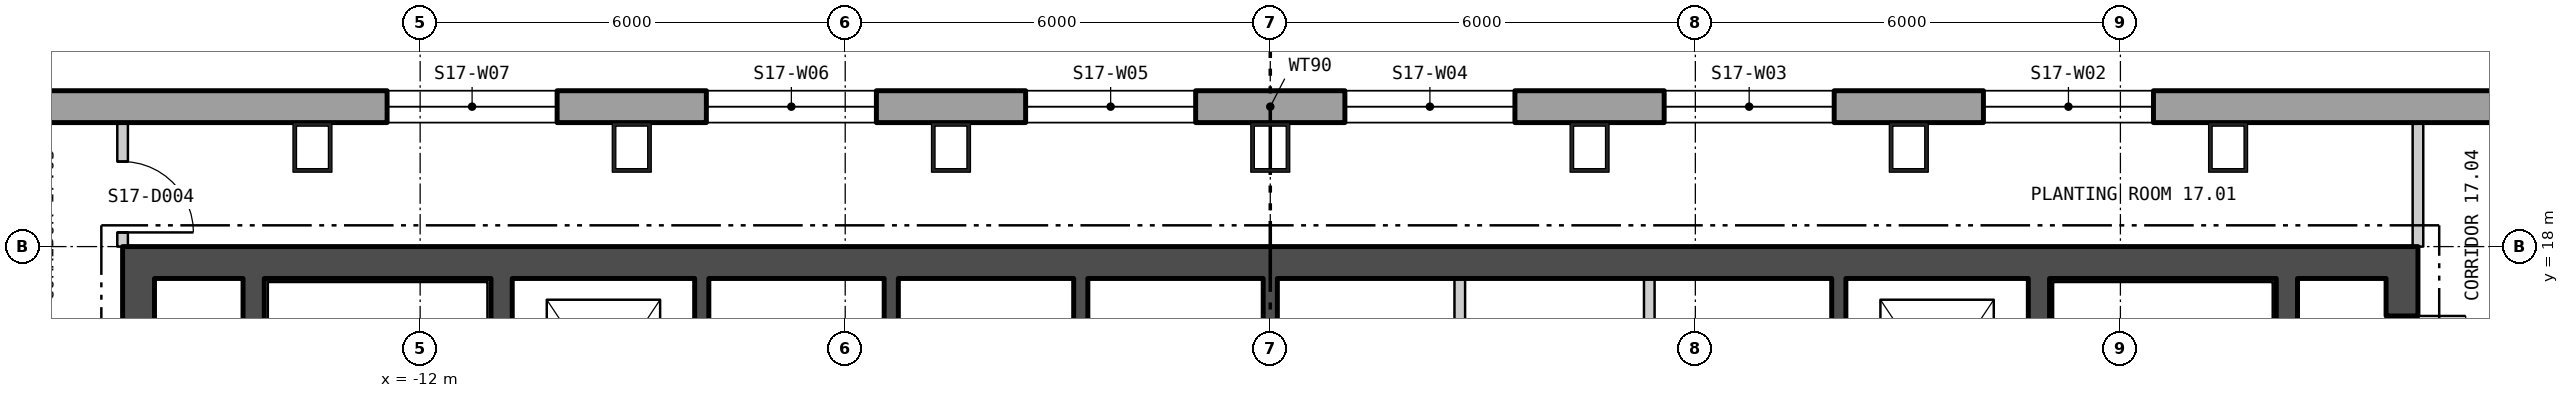
"""IFC4 building model, lengths in metres.
Left out: names, types, materials, properties, quantities, classifications, styles, units other than length and angle.
Written with IfcOpenShell. Run it as: python <this file> out.ifc"""

import sys

from ifc_helpers import new_model, si_unit, direction, frame, frame_2d, origin, origin_2d, place, context, subcontext, project, spatial, polyline, rectangle, hollow_rectangle, outline, extrude, element, fill, save


model = new_model("IFC4")
c1 = context("Model", 3, precision=1e-05, world=origin(), true_north=direction((0.0, 1.0)))
c2 = subcontext(c1, "Body", "Model", "MODEL_VIEW")
j1 = project(units=[si_unit("LENGTHUNIT", "METRE"), si_unit("PLANEANGLEUNIT", "RADIAN")], contexts=[c1])
p1 = place(None, origin())
s1 = spatial("IfcSite", under=j1, at=p1, CompositionType="ELEMENT")
p2 = place(p1, origin())
s2 = spatial("IfcBuilding", under=s1, at=p2, CompositionType="ELEMENT")
p3 = place(p2, frame((0.0, 0.0, 227.7)))
s3 = spatial("IfcBuildingStorey", under=s2, at=p3, CompositionType="ELEMENT", Elevation=227.7)
for number, where, z_axis, x_axis in (
    (1, (13.52, 19.4, 0.0), (0.0, 0.0, 1.0), (-1.0, 0.0, 0.0)),
    (2, (9.013, 19.4, 0.0), (0.0, 0.0, 1.0), (-1.0, 0.0, 0.0)),
    (3, (4.507, 19.4, 0.0), (0.0, 0.0, 1.0), (-1.0, 0.0, 0.0)),
    (4, (0.0, 19.4, 0.0), (0.0, 0.0, 1.0), (-1.0, 0.0, 0.0)),
    (5, (-4.507, 19.4, 0.0), (0.0, 0.0, 1.0), (-1.0, 0.0, 0.0)),
    (6, (-9.013, 19.4, 0.0), (0.0, 0.0, 1.0), (-1.0, 0.0, 0.0)),
    (7, (-13.52, 19.4, 0.0), (0.0, 0.0, 1.0), (-1.0, 0.0, 0.0)),
):
    element("IfcColumn", number, at=place(p3, frame(where, z_axis=z_axis, x_axis=x_axis)), inside=s3, PredefinedType="COLUMN", context=c2, shape_type="SweptSolid", body=[
        extrude(hollow_rectangle(XDim=0.55, YDim=0.7, WallThickness=0.05, at=origin_2d()), origin(), (0.0, 0.0, 1.0), 3.9),
    ])
p4 = place(p3, frame((22.865, 19.975, -0.4), z_axis=(0.0, 0.0, 1.0), x_axis=(-1.0, 0.0, 0.0)))
e8 = element("IfcWall", 8, at=p4, inside=s3, PredefinedType="SOLIDWALL", context=c2, shape_type="SweptSolid", body=[
    extrude(outline(polyline([(-0.13, -0.225), (45.86, -0.225), (45.6, 0.225), (0.13, 0.225), (-0.13, -0.225)])), origin(), (0.0, 0.0, 1.0), 3.9),
])
p5 = place(p4, frame((1.424, 0.0, 1.3)))
e9 = element("IfcOpeningElement", 9, at=p5, cuts=e8, PredefinedType="OPENING", context=c2, shape_type="SweptSolid", body=[
    extrude(rectangle(XDim=2.4, YDim=2.0, at=frame_2d((1.2, 1.0))), frame((0.0, 0.235, 0.0), z_axis=(0.0, -1.0, 0.0), x_axis=(1.0, 0.0, 0.0)), (0.0, 0.0, 1.0), 0.47),
])
p6 = place(p4, frame((10.399, 0.0, 1.3)))
e10 = element("IfcOpeningElement", 10, at=p6, cuts=e8, PredefinedType="OPENING", context=c2, shape_type="SweptSolid", body=[
    extrude(rectangle(XDim=2.4, YDim=2.0, at=frame_2d((1.2, 1.0))), frame((0.0, 0.235, 0.0), z_axis=(0.0, -1.0, 0.0), x_axis=(1.0, 0.0, 0.0)), (0.0, 0.0, 1.0), 0.47),
])
p7 = place(p4, frame((14.905, 0.0, 1.3)))
e11 = element("IfcOpeningElement", 11, at=p7, cuts=e8, PredefinedType="OPENING", context=c2, shape_type="SweptSolid", body=[
    extrude(rectangle(XDim=2.4, YDim=2.0, at=frame_2d((1.2, 1.0))), frame((0.0, 0.235, 0.0), z_axis=(0.0, -1.0, 0.0), x_axis=(1.0, 0.0, 0.0)), (0.0, 0.0, 1.0), 0.47),
])
p8 = place(p4, frame((19.412, 0.0, 1.3)))
e12 = element("IfcOpeningElement", 12, at=p8, cuts=e8, PredefinedType="OPENING", context=c2, shape_type="SweptSolid", body=[
    extrude(rectangle(XDim=2.4, YDim=2.0, at=frame_2d((1.2, 1.0))), frame((0.0, 0.235, 0.0), z_axis=(0.0, -1.0, 0.0), x_axis=(1.0, 0.0, 0.0)), (0.0, 0.0, 1.0), 0.47),
])
p9 = place(p4, frame((23.918, 0.0, 1.3)))
e13 = element("IfcOpeningElement", 13, at=p9, cuts=e8, PredefinedType="OPENING", context=c2, shape_type="SweptSolid", body=[
    extrude(rectangle(XDim=2.4, YDim=2.0, at=frame_2d((1.2, 1.0))), frame((0.0, 0.235, 0.0), z_axis=(0.0, -1.0, 0.0), x_axis=(1.0, 0.0, 0.0)), (0.0, 0.0, 1.0), 0.47),
])
p10 = place(p4, frame((28.425, 0.0, 1.3)))
e14 = element("IfcOpeningElement", 14, at=p10, cuts=e8, PredefinedType="OPENING", context=c2, shape_type="SweptSolid", body=[
    extrude(rectangle(XDim=2.4, YDim=2.0, at=frame_2d((1.2, 1.0))), frame((0.0, 0.235, 0.0), z_axis=(0.0, -1.0, 0.0), x_axis=(1.0, 0.0, 0.0)), (0.0, 0.0, 1.0), 0.47),
])
p11 = place(p4, frame((32.932, 0.0, 1.3)))
e15 = element("IfcOpeningElement", 15, at=p11, cuts=e8, PredefinedType="OPENING", context=c2, shape_type="SweptSolid", body=[
    extrude(rectangle(XDim=2.4, YDim=2.0, at=frame_2d((1.2, 1.0))), frame((0.0, 0.235, 0.0), z_axis=(0.0, -1.0, 0.0), x_axis=(1.0, 0.0, 0.0)), (0.0, 0.0, 1.0), 0.47),
])
p12 = place(p4, frame((41.907, 0.0, 1.3)))
e16 = element("IfcOpeningElement", 16, at=p12, cuts=e8, PredefinedType="OPENING", context=c2, shape_type="SweptSolid", body=[
    extrude(rectangle(XDim=2.4, YDim=2.0, at=frame_2d((1.2, 1.0))), frame((0.0, 0.235, 0.0), z_axis=(0.0, -1.0, 0.0), x_axis=(1.0, 0.0, 0.0)), (0.0, 0.0, 1.0), 0.47),
])
p13 = place(p3, frame((-16.2, 17.775, 0.0), z_axis=(0.0, 0.0, 1.0), x_axis=(1.0, 0.0, 0.0)))
e17 = element("IfcWall", 17, at=p13, inside=s3, PredefinedType="SHEAR", context=c2, shape_type="SweptSolid", body=[
    extrude(rectangle(XDim=32.4, YDim=0.45, at=frame_2d((16.2, 0.0))), origin(), (0.0, 0.0, 1.0), 3.7),
])
p14 = place(p3, frame((-15.975, 2.45, 0.0), z_axis=(0.0, 0.0, 1.0), x_axis=(0.0, 1.0, 0.0)))
e18 = element("IfcWall", 18, at=p14, inside=s3, PredefinedType="SHEAR", context=c2, shape_type="SweptSolid", body=[
    extrude(rectangle(XDim=15.1, YDim=0.45, at=frame_2d((7.55, 0.0))), origin(), (0.0, 0.0, 1.0), 3.7),
])
p15 = place(p14, frame((4.4, 0.0, 0.0)))
e19 = element("IfcOpeningElement", 19, at=p15, cuts=e18, PredefinedType="OPENING", context=c2, shape_type="SweptSolid", body=[
    extrude(rectangle(XDim=1.5, YDim=2.1, at=frame_2d((0.75, 1.05))), frame((0.0, 0.235, 0.0), z_axis=(0.0, -1.0, 0.0), x_axis=(1.0, 0.0, 0.0)), (0.0, 0.0, 1.0), 0.47),
])
p16 = place(p14, frame((0.85, 0.0, 0.0)))
e20 = element("IfcOpeningElement", 20, at=p16, cuts=e18, PredefinedType="OPENING", context=c2, shape_type="SweptSolid", body=[
    extrude(rectangle(XDim=0.9, YDim=2.1, at=frame_2d((0.45, 1.05))), frame((0.0, 0.235, 0.0), z_axis=(0.0, -1.0, 0.0), x_axis=(1.0, 0.0, 0.0)), (0.0, 0.0, 1.0), 0.47),
])
p17 = place(p14, frame((3.0, 0.0, 0.0)))
e21 = element("IfcOpeningElement", 21, at=p17, cuts=e18, PredefinedType="OPENING", context=c2, shape_type="SweptSolid", body=[
    extrude(rectangle(XDim=1.0, YDim=2.1, at=frame_2d((0.5, 1.05))), frame((0.0, 0.235, 0.0), z_axis=(0.0, -1.0, 0.0), x_axis=(1.0, 0.0, 0.0)), (0.0, 0.0, 1.0), 0.47),
])
p18 = place(p14, frame((8.951, 0.0, 0.0)))
e22 = element("IfcOpeningElement", 22, at=p18, cuts=e18, PredefinedType="OPENING", context=c2, shape_type="SweptSolid", body=[
    extrude(rectangle(XDim=0.9, YDim=2.1, at=frame_2d((0.45, 1.05))), frame((0.0, 0.235, 0.0), z_axis=(0.0, -1.0, 0.0), x_axis=(1.0, 0.0, 0.0)), (0.0, 0.0, 1.0), 0.47),
])
p19 = place(p14, frame((13.551, 0.0, 0.0)))
e23 = element("IfcOpeningElement", 23, at=p19, cuts=e18, PredefinedType="OPENING", context=c2, shape_type="SweptSolid", body=[
    extrude(rectangle(XDim=0.9, YDim=2.1, at=frame_2d((0.45, 1.05))), frame((0.0, 0.235, 0.0), z_axis=(0.0, -1.0, 0.0), x_axis=(1.0, 0.0, 0.0)), (0.0, 0.0, 1.0), 0.47),
])
p20 = place(p3, frame((15.975, 2.45, 0.0), z_axis=(0.0, 0.0, 1.0), x_axis=(0.0, 1.0, 0.0)))
e24 = element("IfcWall", 24, at=p20, inside=s3, PredefinedType="SHEAR", context=c2, shape_type="SweptSolid", body=[
    extrude(rectangle(XDim=15.1, YDim=0.45, at=frame_2d((7.55, 0.0))), origin(), (0.0, 0.0, 1.0), 3.7),
])
p21 = place(p20, frame((4.4, 0.0, 0.0)))
e25 = element("IfcOpeningElement", 25, at=p21, cuts=e24, PredefinedType="OPENING", context=c2, shape_type="SweptSolid", body=[
    extrude(rectangle(XDim=1.5, YDim=2.1, at=frame_2d((0.75, 1.05))), frame((0.0, 0.235, 0.0), z_axis=(0.0, -1.0, 0.0), x_axis=(1.0, 0.0, 0.0)), (0.0, 0.0, 1.0), 0.47),
])
p22 = place(p20, frame((0.4, 0.0, 0.0)))
e26 = element("IfcOpeningElement", 26, at=p22, cuts=e24, PredefinedType="OPENING", context=c2, shape_type="SweptSolid", body=[
    extrude(rectangle(XDim=1.0, YDim=2.1, at=frame_2d((0.5, 1.05))), frame((0.0, 0.235, 0.0), z_axis=(0.0, -1.0, 0.0), x_axis=(1.0, 0.0, 0.0)), (0.0, 0.0, 1.0), 0.47),
])
p23 = place(p20, frame((2.5, 0.0, 0.0)))
e27 = element("IfcOpeningElement", 27, at=p23, cuts=e24, PredefinedType="OPENING", context=c2, shape_type="SweptSolid", body=[
    extrude(rectangle(XDim=0.9, YDim=2.1, at=frame_2d((0.45, 1.05))), frame((0.0, 0.235, 0.0), z_axis=(0.0, -1.0, 0.0), x_axis=(1.0, 0.0, 0.0)), (0.0, 0.0, 1.0), 0.47),
])
p24 = place(p20, frame((9.071, 0.0, 0.0)))
e28 = element("IfcOpeningElement", 28, at=p24, cuts=e24, PredefinedType="OPENING", context=c2, shape_type="SweptSolid", body=[
    extrude(rectangle(XDim=0.9, YDim=2.1, at=frame_2d((0.45, 1.05))), frame((0.0, 0.235, 0.0), z_axis=(0.0, -1.0, 0.0), x_axis=(1.0, 0.0, 0.0)), (0.0, 0.0, 1.0), 0.47),
])
p25 = place(p20, frame((13.671, 0.0, 0.0)))
e29 = element("IfcOpeningElement", 29, at=p25, cuts=e24, PredefinedType="OPENING", context=c2, shape_type="SweptSolid", body=[
    extrude(rectangle(XDim=0.9, YDim=2.1, at=frame_2d((0.45, 1.05))), frame((0.0, 0.235, 0.0), z_axis=(0.0, -1.0, 0.0), x_axis=(1.0, 0.0, 0.0)), (0.0, 0.0, 1.0), 0.47),
])
p26 = place(p3, frame((-10.85, 2.45, 0.0), z_axis=(0.0, 0.0, 1.0), x_axis=(0.0, 1.0, 0.0)))
e30 = element("IfcWall", 30, at=p26, inside=s3, PredefinedType="SHEAR", context=c2, shape_type="SweptSolid", body=[
    extrude(rectangle(XDim=15.1, YDim=0.3, at=frame_2d((7.55, 0.0))), origin(), (0.0, 0.0, 1.0), 3.7),
])
p27 = place(p26, frame((3.525, 0.0, 0.0)))
e31 = element("IfcOpeningElement", 31, at=p27, cuts=e30, PredefinedType="OPENING", context=c2, shape_type="SweptSolid", body=[
    extrude(rectangle(XDim=1.25, YDim=2.1, at=frame_2d((0.625, 1.05))), frame((0.0, 0.16, 0.0), z_axis=(0.0, -1.0, 0.0), x_axis=(1.0, 0.0, 0.0)), (0.0, 0.0, 1.0), 0.32),
])
p28 = place(p26, frame((1.15, 0.0, 0.0)))
e32 = element("IfcOpeningElement", 32, at=p28, cuts=e30, PredefinedType="OPENING", context=c2, shape_type="SweptSolid", body=[
    extrude(rectangle(XDim=1.0, YDim=2.1, at=frame_2d((0.5, 1.05))), frame((0.0, 0.16, 0.0), z_axis=(0.0, -1.0, 0.0), x_axis=(1.0, 0.0, 0.0)), (0.0, 0.0, 1.0), 0.32),
])
p29 = place(p3, frame((-14.35, 2.45, 0.0), z_axis=(0.0, 0.0, 1.0), x_axis=(0.0, 1.0, 0.0)))
e33 = element("IfcWall", 33, at=p29, inside=s3, PredefinedType="SHEAR", context=c2, shape_type="SweptSolid", body=[
    extrude(rectangle(XDim=15.1, YDim=0.3, at=frame_2d((7.55, 0.0))), origin(), (0.0, 0.0, 1.0), 3.7),
])
p30 = place(p29, frame((4.4, 0.0, 0.0)))
e34 = element("IfcOpeningElement", 34, at=p30, cuts=e33, PredefinedType="OPENING", context=c2, shape_type="SweptSolid", body=[
    extrude(rectangle(XDim=1.5, YDim=2.1, at=frame_2d((0.75, 1.05))), frame((0.0, 0.16, 0.0), z_axis=(0.0, -1.0, 0.0), x_axis=(1.0, 0.0, 0.0)), (0.0, 0.0, 1.0), 0.32),
])
p31 = place(p3, frame((10.85, 2.45, 0.0), z_axis=(0.0, 0.0, 1.0), x_axis=(0.0, 1.0, 0.0)))
e35 = element("IfcWall", 35, at=p31, inside=s3, PredefinedType="SHEAR", context=c2, shape_type="SweptSolid", body=[
    extrude(rectangle(XDim=15.1, YDim=0.3, at=frame_2d((7.55, 0.0))), origin(), (0.0, 0.0, 1.0), 3.7),
])
p32 = place(p31, frame((3.525, 0.0, 0.0)))
e36 = element("IfcOpeningElement", 36, at=p32, cuts=e35, PredefinedType="OPENING", context=c2, shape_type="SweptSolid", body=[
    extrude(rectangle(XDim=1.25, YDim=2.1, at=frame_2d((0.625, 1.05))), frame((0.0, 0.16, 0.0), z_axis=(0.0, -1.0, 0.0), x_axis=(1.0, 0.0, 0.0)), (0.0, 0.0, 1.0), 0.32),
])
p33 = place(p31, frame((1.15, 0.0, 0.0)))
e37 = element("IfcOpeningElement", 37, at=p33, cuts=e35, PredefinedType="OPENING", context=c2, shape_type="SweptSolid", body=[
    extrude(rectangle(XDim=1.0, YDim=2.1, at=frame_2d((0.5, 1.05))), frame((0.0, 0.16, 0.0), z_axis=(0.0, -1.0, 0.0), x_axis=(1.0, 0.0, 0.0)), (0.0, 0.0, 1.0), 0.32),
])
p34 = place(p3, frame((14.35, 2.45, 0.0), z_axis=(0.0, 0.0, 1.0), x_axis=(0.0, 1.0, 0.0)))
e38 = element("IfcWall", 38, at=p34, inside=s3, PredefinedType="SHEAR", context=c2, shape_type="SweptSolid", body=[
    extrude(rectangle(XDim=15.1, YDim=0.3, at=frame_2d((7.55, 0.0))), origin(), (0.0, 0.0, 1.0), 3.7),
])
p35 = place(p34, frame((4.4, 0.0, 0.0)))
e39 = element("IfcOpeningElement", 39, at=p35, cuts=e38, PredefinedType="OPENING", context=c2, shape_type="SweptSolid", body=[
    extrude(rectangle(XDim=1.5, YDim=2.1, at=frame_2d((0.75, 1.05))), frame((0.0, 0.16, 0.0), z_axis=(0.0, -1.0, 0.0), x_axis=(1.0, 0.0, 0.0)), (0.0, 0.0, 1.0), 0.32),
])
for number, where, z_axis, x_axis in (
    (40, (-8.025, 14.7, 0.0), (0.0, 0.0, 1.0), (0.0, 1.0, 0.0)),
    (41, (-5.35, 14.7, 0.0), (0.0, 0.0, 1.0), (0.0, 1.0, 0.0)),
    (42, (-2.675, 14.7, 0.0), (0.0, 0.0, 1.0), (0.0, 1.0, 0.0)),
    (43, (0.0, 14.7, 0.0), (0.0, 0.0, 1.0), (0.0, 1.0, 0.0)),
):
    element("IfcWall", number, at=place(p3, frame(where, z_axis=z_axis, x_axis=x_axis)), inside=s3, PredefinedType="SHEAR", context=c2, shape_type="SweptSolid", body=[
        extrude(rectangle(XDim=2.85, YDim=0.2, at=frame_2d((1.425, 0.0))), origin(), (0.0, 0.0, 1.0), 3.7),
    ])
for number, where, z_axis, x_axis in (
    (44, (2.675, 14.7, 0.0), (0.0, 0.0, 1.0), (0.0, 1.0, 0.0)),
    (45, (5.35, 14.7, 0.0), (0.0, 0.0, 1.0), (0.0, 1.0, 0.0)),
):
    element("IfcWall", number, at=place(p3, frame(where, z_axis=z_axis, x_axis=x_axis)), inside=s3, PredefinedType="PARTITIONING", context=c2, shape_type="SweptSolid", body=[
        extrude(rectangle(XDim=2.85, YDim=0.15, at=frame_2d((1.425, 0.0))), origin(), (0.0, 0.0, 1.0), 3.7),
    ])
p36 = place(p3, frame((8.025, 14.7, 0.0), z_axis=(0.0, 0.0, 1.0), x_axis=(0.0, 1.0, 0.0)))
e46 = element("IfcWall", 46, at=p36, inside=s3, PredefinedType="SHEAR", context=c2, shape_type="SweptSolid", body=[
    extrude(rectangle(XDim=2.85, YDim=0.2, at=frame_2d((1.425, 0.0))), origin(), (0.0, 0.0, 1.0), 3.7),
])
p37 = place(p3, frame((-16.2, 18.0, 0.0), z_axis=(0.0, 0.0, 1.0), x_axis=(0.0, 1.0, 0.0)))
e47 = element("IfcWall", 47, at=p37, inside=s3, PredefinedType="PARTITIONING", context=c2, shape_type="SweptSolid", body=[
    extrude(rectangle(XDim=1.75, YDim=0.15, at=frame_2d((0.875, 0.0))), origin(), (0.0, 0.0, 1.0), 3.7),
])
p38 = place(p37, frame((0.2, 0.0, 0.0)))
e48 = element("IfcOpeningElement", 48, at=p38, cuts=e47, PredefinedType="OPENING", context=c2, shape_type="SweptSolid", body=[
    extrude(rectangle(XDim=1.0, YDim=2.1, at=frame_2d((0.5, 1.05))), frame((0.0, 0.085, 0.0), z_axis=(0.0, -1.0, 0.0), x_axis=(1.0, 0.0, 0.0)), (0.0, 0.0, 1.0), 0.17),
])
p39 = place(p3, frame((16.2, 18.0, 0.0), z_axis=(0.0, 0.0, 1.0), x_axis=(0.0, 1.0, 0.0)))
e49 = element("IfcWall", 49, at=p39, inside=s3, PredefinedType="PARTITIONING", context=c2, shape_type="SweptSolid", body=[
    extrude(rectangle(XDim=1.75, YDim=0.15, at=frame_2d((0.875, 0.0))), origin(), (0.0, 0.0, 1.0), 3.7),
])
p40 = place(p6, origin())
e50 = element("IfcWindow", 50, at=p40, inside=s3, PartitioningType="SINGLE_PANEL", PredefinedType="WINDOW", context=c2, shape_type="SweptSolid", body=[
    extrude(rectangle(XDim=2.4, YDim=2.0, at=frame_2d((1.2, 1.0))), frame((0.0, 0.105, 0.0), z_axis=(0.0, -1.0, 0.0), x_axis=(1.0, 0.0, 0.0)), (0.0, 0.0, 1.0), 0.06),
])
fill(e10, e50)
p41 = place(p7, origin())
e51 = element("IfcWindow", 51, at=p41, inside=s3, PartitioningType="SINGLE_PANEL", PredefinedType="WINDOW", context=c2, shape_type="SweptSolid", body=[
    extrude(rectangle(XDim=2.4, YDim=2.0, at=frame_2d((1.2, 1.0))), frame((0.0, 0.105, 0.0), z_axis=(0.0, -1.0, 0.0), x_axis=(1.0, 0.0, 0.0)), (0.0, 0.0, 1.0), 0.06),
])
fill(e11, e51)
p42 = place(p8, origin())
e52 = element("IfcWindow", 52, at=p42, inside=s3, PartitioningType="SINGLE_PANEL", PredefinedType="WINDOW", context=c2, shape_type="SweptSolid", body=[
    extrude(rectangle(XDim=2.4, YDim=2.0, at=frame_2d((1.2, 1.0))), frame((0.0, 0.105, 0.0), z_axis=(0.0, -1.0, 0.0), x_axis=(1.0, 0.0, 0.0)), (0.0, 0.0, 1.0), 0.06),
])
fill(e12, e52)
p43 = place(p9, origin())
e53 = element("IfcWindow", 53, at=p43, inside=s3, PartitioningType="SINGLE_PANEL", PredefinedType="WINDOW", context=c2, shape_type="SweptSolid", body=[
    extrude(rectangle(XDim=2.4, YDim=2.0, at=frame_2d((1.2, 1.0))), frame((0.0, 0.105, 0.0), z_axis=(0.0, -1.0, 0.0), x_axis=(1.0, 0.0, 0.0)), (0.0, 0.0, 1.0), 0.06),
])
fill(e13, e53)
p44 = place(p10, origin())
e54 = element("IfcWindow", 54, at=p44, inside=s3, PartitioningType="SINGLE_PANEL", PredefinedType="WINDOW", context=c2, shape_type="SweptSolid", body=[
    extrude(rectangle(XDim=2.4, YDim=2.0, at=frame_2d((1.2, 1.0))), frame((0.0, 0.105, 0.0), z_axis=(0.0, -1.0, 0.0), x_axis=(1.0, 0.0, 0.0)), (0.0, 0.0, 1.0), 0.06),
])
fill(e14, e54)
p45 = place(p11, origin())
e55 = element("IfcWindow", 55, at=p45, inside=s3, PartitioningType="SINGLE_PANEL", PredefinedType="WINDOW", context=c2, shape_type="SweptSolid", body=[
    extrude(rectangle(XDim=2.4, YDim=2.0, at=frame_2d((1.2, 1.0))), frame((0.0, 0.105, 0.0), z_axis=(0.0, -1.0, 0.0), x_axis=(1.0, 0.0, 0.0)), (0.0, 0.0, 1.0), 0.06),
])
fill(e15, e55)
p46 = place(p25, origin())
e56 = element("IfcDoor", 56, at=p46, inside=s3, OperationType="SINGLE_SWING_RIGHT", PredefinedType="DOOR", context=c2, shape_type="SweptSolid", body=[
    extrude(rectangle(XDim=0.9, YDim=2.1, at=frame_2d((0.45, 1.05))), frame((0.0, 0.025, 0.0), z_axis=(0.0, -1.0, 0.0), x_axis=(1.0, 0.0, 0.0)), (0.0, 0.0, 1.0), 0.05),
])
fill(e29, e56)
p47 = place(p38, origin())
e57 = element("IfcDoor", 57, at=p47, inside=s3, OperationType="SINGLE_SWING_LEFT", PredefinedType="DOOR", context=c2, shape_type="SweptSolid", body=[
    extrude(rectangle(XDim=1.0, YDim=2.1, at=frame_2d((0.5, 1.05))), frame((0.0, 0.025, 0.0), z_axis=(0.0, -1.0, 0.0), x_axis=(1.0, 0.0, 0.0)), (0.0, 0.0, 1.0), 0.05),
])
fill(e48, e57)
save(model, sys.argv[1])
